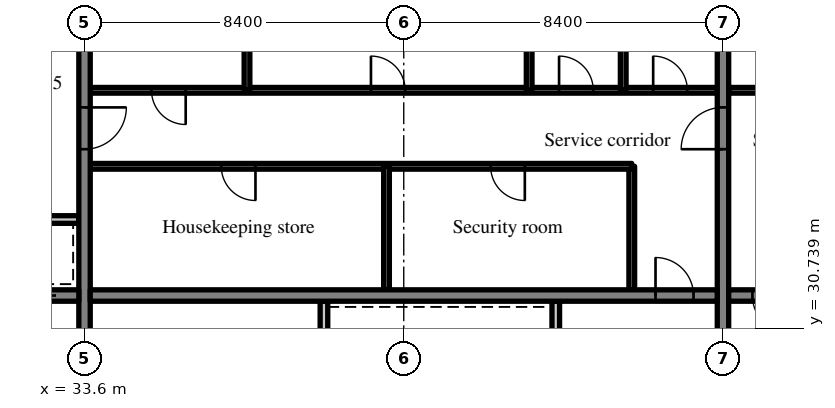
"""IFC4 building model, lengths in metres.
Left out: names, types, materials, properties, quantities, classifications, styles, units other than length and angle.
Written with IfcOpenShell. Run it as: python <this file> out.ifc"""

import sys

from ifc_helpers import new_model, si_unit, direction, frame, frame_2d, origin, place, context, subcontext, project, spatial, rectangle, extrude, source, transform, mapped, element, fill, save


model = new_model("IFC4")
c1 = context("Model", 3, precision=1e-05, world=origin(), true_north=direction((0.0, 1.0)))
c2 = subcontext(c1, "Body", "Model", "MODEL_VIEW")
j1 = project(units=[si_unit("LENGTHUNIT", "METRE"), si_unit("PLANEANGLEUNIT", "RADIAN")], contexts=[c1])
p1 = place(None, origin())
s1 = spatial("IfcSite", under=j1, at=p1, CompositionType="ELEMENT")
p2 = place(p1, origin())
s2 = spatial("IfcBuilding", under=s1, at=p2, CompositionType="ELEMENT")
p3 = place(p2, frame((0.0, 0.0, 301.7)))
s3 = spatial("IfcBuildingStorey", under=s2, at=p3, CompositionType="ELEMENT", Elevation=301.7)
m1 = source(origin(), c2, "Body", "SweptSolid", [
    extrude(rectangle(XDim=19.0, YDim=0.3, at=frame_2d((9.5, 0.0))), origin(), (0.0, 0.0, 1.0), 3.72),
])
p4 = place(p3, frame((33.6, 22.5, 0.0), z_axis=(0.0, 0.0, 1.0), x_axis=(0.0, 1.0, 0.0)))
e1 = element("IfcWall", 1, at=p4, inside=s3, PredefinedType="SHEAR", context=c2, shape_type="MappedRepresentation", body=[
    mapped(m1, transform((0.0, 0.0, 0.0), scale=1.0)),
])
m2 = source(origin(), c2, "Body", "SweptSolid", [
    extrude(rectangle(XDim=1.1, YDim=2.1, at=frame_2d((0.55, 1.05))), frame((0.0, 0.16, 0.0), z_axis=(0.0, -1.0, 0.0), x_axis=(1.0, 0.0, 0.0)), (0.0, 0.0, 1.0), 0.32),
])
p5 = place(p4, frame((12.95, 0.0, 0.0)))
e2 = element("IfcOpeningElement", 2, at=p5, cuts=e1, PredefinedType="OPENING", context=c2, shape_type="MappedRepresentation", body=[
    mapped(m2, transform((0.0, 0.0, 0.0), scale=1.0)),
])
p6 = place(p3, frame((50.4, 22.5, 0.0), z_axis=(0.0, 0.0, 1.0), x_axis=(0.0, 1.0, 0.0)))
e3 = element("IfcWall", 3, at=p6, inside=s3, PredefinedType="SHEAR", context=c2, shape_type="MappedRepresentation", body=[
    mapped(m1, transform((0.0, 0.0, 0.0), scale=1.0)),
])
p7 = place(p6, frame((12.95, 0.0, 0.0)))
e4 = element("IfcOpeningElement", 4, at=p7, cuts=e3, PredefinedType="OPENING", context=c2, shape_type="MappedRepresentation", body=[
    mapped(m2, transform((0.0, 0.0, 0.0), scale=1.0)),
])
m3 = source(origin(), c2, "Body", "SweptSolid", [
    extrude(rectangle(XDim=7.75, YDim=0.3, at=frame_2d((3.875, 0.0))), origin(), (0.0, 0.0, 1.0), 3.72),
])
p8 = place(p3, frame((25.7, 31.6, 0.0), z_axis=(0.0, 0.0, 1.0), x_axis=(1.0, 0.0, 0.0)))
e5 = element("IfcWall", 5, at=p8, inside=s3, PredefinedType="SHEAR", context=c2, shape_type="MappedRepresentation", body=[
    mapped(m3, transform((0.0, 0.0, 0.0), scale=1.0)),
])
p9 = place(p8, frame((6.05, 0.0, 0.0)))
e6 = element("IfcOpeningElement", 6, at=p9, cuts=e5, PredefinedType="OPENING", context=c2, shape_type="MappedRepresentation", body=[
    mapped(m2, transform((0.0, 0.0, 0.0), scale=1.0)),
])
m4 = source(origin(), c2, "Body", "SweptSolid", [
    extrude(rectangle(XDim=16.5, YDim=0.3, at=frame_2d((8.25, 0.0))), origin(), (0.0, 0.0, 1.0), 3.72),
])
p10 = place(p3, frame((33.75, 31.6, 0.0), z_axis=(0.0, 0.0, 1.0), x_axis=(1.0, 0.0, 0.0)))
e7 = element("IfcWall", 7, at=p10, inside=s3, PredefinedType="SHEAR", context=c2, shape_type="MappedRepresentation", body=[
    mapped(m4, transform((0.0, 0.0, 0.0), scale=1.0)),
])
m5 = source(origin(), c2, "Body", "SweptSolid", [
    extrude(rectangle(XDim=1.0, YDim=2.1, at=frame_2d((0.5, 1.05))), frame((0.0, 0.16, 0.0), z_axis=(0.0, -1.0, 0.0), x_axis=(1.0, 0.0, 0.0)), (0.0, 0.0, 1.0), 0.32),
])
p11 = place(p10, frame((14.875, 0.0, 0.0)))
e8 = element("IfcOpeningElement", 8, at=p11, cuts=e7, PredefinedType="OPENING", context=c2, shape_type="MappedRepresentation", body=[
    mapped(m5, transform((0.0, 0.0, 0.0), scale=1.0)),
])
p12 = place(p3, frame((50.55, 31.6, 0.0), z_axis=(0.0, 0.0, 1.0), x_axis=(1.0, 0.0, 0.0)))
e9 = element("IfcWall", 9, at=p12, inside=s3, PredefinedType="SHEAR", context=c2, shape_type="MappedRepresentation", body=[
    mapped(m4, transform((0.0, 0.0, 0.0), scale=1.0)),
])
p13 = place(p12, frame((0.625, 0.0, 0.0)))
e10 = element("IfcOpeningElement", 10, at=p13, cuts=e9, PredefinedType="OPENING", context=c2, shape_type="MappedRepresentation", body=[
    mapped(m5, transform((0.0, 0.0, 0.0), scale=1.0)),
])
m6 = source(origin(), c2, "Body", "SweptSolid", [
    extrude(rectangle(XDim=8.95, YDim=0.2, at=frame_2d((4.475, 0.0))), origin(), (0.0, 0.0, 1.0), 3.72),
])
p14 = place(p3, frame((39.9, 22.5, 0.0), z_axis=(0.0, 0.0, 1.0), x_axis=(0.0, 1.0, 0.0)))
e11 = element("IfcWall", 11, at=p14, inside=s3, PredefinedType="PARTITIONING", context=c2, shape_type="MappedRepresentation", body=[
    mapped(m6, transform((0.0, 0.0, 0.0), scale=1.0)),
])
m7 = source(origin(), c2, "Body", "SweptSolid", [
    extrude(rectangle(XDim=0.9, YDim=2.1, at=frame_2d((0.45, 1.05))), frame((0.0, 0.11, 0.0), z_axis=(0.0, -1.0, 0.0), x_axis=(1.0, 0.0, 0.0)), (0.0, 0.0, 1.0), 0.22),
])
p15 = place(p14, frame((5.05, 0.0, 0.0)))
e12 = element("IfcOpeningElement", 12, at=p15, cuts=e11, PredefinedType="OPENING", context=c2, shape_type="MappedRepresentation", body=[
    mapped(m7, transform((0.0, 0.0, 0.0), scale=1.0)),
])
m8 = source(origin(), c2, "Body", "SweptSolid", [
    extrude(rectangle(XDim=2.65, YDim=0.2, at=frame_2d((1.325, 0.0))), origin(), (0.0, 0.0, 1.0), 3.72),
])
p16 = place(p3, frame((46.0, 28.8, 0.0), z_axis=(0.0, 0.0, 1.0), x_axis=(0.0, 1.0, 0.0)))
e13 = element("IfcWall", 13, at=p16, inside=s3, PredefinedType="SOLIDWALL", context=c2, shape_type="MappedRepresentation", body=[
    mapped(m8, transform((0.0, 0.0, 0.0), scale=1.0)),
])
m9 = source(origin(), c2, "Body", "SweptSolid", [
    extrude(rectangle(XDim=3.25, YDim=0.15, at=frame_2d((1.625, 0.0))), origin(), (0.0, 0.0, 1.0), 3.72),
])
p17 = place(p3, frame((48.0, 31.75, 0.0), z_axis=(0.0, 0.0, 1.0), x_axis=(0.0, 1.0, 0.0)))
e14 = element("IfcWall", 14, at=p17, inside=s3, PredefinedType="PARTITIONING", context=c2, shape_type="MappedRepresentation", body=[
    mapped(m9, transform((0.0, 0.0, 0.0), scale=1.0)),
])
m10 = source(origin(), c2, "Body", "SweptSolid", [
    extrude(rectangle(XDim=14.25, YDim=0.15, at=frame_2d((7.125, 0.0))), origin(), (0.0, 0.0, 1.0), 3.72),
])
p18 = place(p3, frame((33.75, 35.0, 0.0), z_axis=(0.0, 0.0, 1.0), x_axis=(1.0, 0.0, 0.0)))
e15 = element("IfcWall", 15, at=p18, inside=s3, PredefinedType="PARTITIONING", context=c2, shape_type="MappedRepresentation", body=[
    mapped(m10, transform((0.0, 0.0, 0.0), scale=1.0)),
])
m11 = source(origin(), c2, "Body", "SweptSolid", [
    extrude(rectangle(XDim=0.9, YDim=2.1, at=frame_2d((0.45, 1.05))), frame((0.0, 0.085, 0.0), z_axis=(0.0, -1.0, 0.0), x_axis=(1.0, 0.0, 0.0)), (0.0, 0.0, 1.0), 0.17),
])
p19 = place(p18, frame((3.448, 0.0, 0.0)))
e16 = element("IfcOpeningElement", 16, at=p19, cuts=e15, PredefinedType="OPENING", context=c2, shape_type="MappedRepresentation", body=[
    mapped(m11, transform((0.0, 0.0, 0.0), scale=1.0)),
])
p20 = place(p18, frame((10.536, 0.0, 0.0)))
e17 = element("IfcOpeningElement", 17, at=p20, cuts=e15, PredefinedType="OPENING", context=c2, shape_type="MappedRepresentation", body=[
    mapped(m11, transform((0.0, 0.0, 0.0), scale=1.0)),
])
m12 = source(origin(), c2, "Body", "SweptSolid", [
    extrude(rectangle(XDim=16.5, YDim=0.15, at=frame_2d((8.25, 0.0))), origin(), (0.0, 0.0, 1.0), 3.72),
])
p21 = place(p3, frame((33.75, 37.0, 0.0), z_axis=(0.0, 0.0, 1.0), x_axis=(1.0, 0.0, 0.0)))
e18 = element("IfcWall", 18, at=p21, inside=s3, PredefinedType="PARTITIONING", context=c2, shape_type="MappedRepresentation", body=[
    mapped(m12, transform((0.0, 0.0, 0.0), scale=1.0)),
])
p22 = place(p21, frame((1.612, 0.0, 0.0)))
e19 = element("IfcOpeningElement", 19, at=p22, cuts=e18, PredefinedType="OPENING", context=c2, shape_type="MappedRepresentation", body=[
    mapped(m11, transform((0.0, 0.0, 0.0), scale=1.0)),
])
p23 = place(p21, frame((7.387, 0.0, 0.0)))
e20 = element("IfcOpeningElement", 20, at=p23, cuts=e18, PredefinedType="OPENING", context=c2, shape_type="MappedRepresentation", body=[
    mapped(m11, transform((0.0, 0.0, 0.0), scale=1.0)),
])
p24 = place(p21, frame((12.337, 0.0, 0.0)))
e21 = element("IfcOpeningElement", 21, at=p24, cuts=e18, PredefinedType="OPENING", context=c2, shape_type="MappedRepresentation", body=[
    mapped(m11, transform((0.0, 0.0, 0.0), scale=1.0)),
])
p25 = place(p21, frame((14.813, 0.0, 0.0)))
e22 = element("IfcOpeningElement", 22, at=p25, cuts=e18, PredefinedType="OPENING", context=c2, shape_type="MappedRepresentation", body=[
    mapped(m11, transform((0.0, 0.0, 0.0), scale=1.0)),
])
p26 = place(p3, frame((41.546, 31.75, 0.0), z_axis=(0.0, 0.0, 1.0), x_axis=(0.0, 1.0, 0.0)))
e23 = element("IfcWall", 23, at=p26, inside=s3, PredefinedType="PARTITIONING", context=c2, shape_type="MappedRepresentation", body=[
    mapped(m9, transform((0.0, 0.0, 0.0), scale=1.0)),
])
m13 = source(origin(), c2, "Body", "SweptSolid", [
    extrude(rectangle(XDim=4.5, YDim=0.15, at=frame_2d((2.25, 0.0))), origin(), (0.0, 0.0, 1.0), 3.72),
])
for number, where, z_axis, x_axis in (
    (24, (37.875, 37.0, 0.0), (0.0, 0.0, 1.0), (0.0, 1.0, 0.0)),
    (25, (45.3, 37.0, 0.0), (0.0, 0.0, 1.0), (0.0, 1.0, 0.0)),
    (26, (47.775, 37.0, 0.0), (0.0, 0.0, 1.0), (0.0, 1.0, 0.0)),
):
    element("IfcWall", number, at=place(p3, frame(where, z_axis=z_axis, x_axis=x_axis)), inside=s3, PredefinedType="PARTITIONING", context=c2, shape_type="MappedRepresentation", body=[
        mapped(m13, transform((0.0, 0.0, 0.0), scale=1.0)),
    ])
p27 = place(p3, frame((67.05, 37.0, 0.0), z_axis=(0.0, 0.0, 1.0), x_axis=(-1.0, 0.0, 0.0)))
e27 = element("IfcWall", 27, at=p27, inside=s3, PredefinedType="PARTITIONING", context=c2, shape_type="MappedRepresentation", body=[
    mapped(m12, transform((0.0, 0.0, 0.0), scale=1.0)),
])
p28 = place(p27, frame((3.263, 0.0, 0.0)))
e28 = element("IfcOpeningElement", 28, at=p28, cuts=e27, PredefinedType="OPENING", context=c2, shape_type="MappedRepresentation", body=[
    mapped(m11, transform((0.0, 0.0, 0.0), scale=1.0)),
])
p29 = place(p27, frame((8.212, 0.0, 0.0)))
e29 = element("IfcOpeningElement", 29, at=p29, cuts=e27, PredefinedType="OPENING", context=c2, shape_type="MappedRepresentation", body=[
    mapped(m11, transform((0.0, 0.0, 0.0), scale=1.0)),
])
p30 = place(p27, frame((11.513, 0.0, 0.0)))
e30 = element("IfcOpeningElement", 30, at=p30, cuts=e27, PredefinedType="OPENING", context=c2, shape_type="MappedRepresentation", body=[
    mapped(m11, transform((0.0, 0.0, 0.0), scale=1.0)),
])
p31 = place(p27, frame((14.813, 0.0, 0.0)))
e31 = element("IfcOpeningElement", 31, at=p31, cuts=e27, PredefinedType="OPENING", context=c2, shape_type="MappedRepresentation", body=[
    mapped(m11, transform((0.0, 0.0, 0.0), scale=1.0)),
])
m14 = source(origin(), c2, "Body", "SweptSolid", [
    extrude(rectangle(XDim=2.3, YDim=0.2, at=frame_2d((1.15, 0.0))), origin(), (0.0, 0.0, 1.0), 3.72),
])
p32 = place(p3, frame((31.15, 33.6, 0.0), z_axis=(0.0, 0.0, 1.0), x_axis=(1.0, 0.0, 0.0)))
e32 = element("IfcWall", 32, at=p32, inside=s3, PredefinedType="SOLIDWALL", context=c2, shape_type="MappedRepresentation", body=[
    mapped(m14, transform((0.0, 0.0, 0.0), scale=1.0)),
])
m15 = source(origin(), c2, "Body", "SweptSolid", [
    extrude(rectangle(XDim=1.0, YDim=2.1, at=frame_2d((0.5, 1.05))), frame((0.0, 0.025, 0.0), z_axis=(0.0, -1.0, 0.0), x_axis=(1.0, 0.0, 0.0)), (0.0, 0.0, 1.0), 0.05),
])
p33 = place(p11, origin())
e33 = element("IfcDoor", 33, at=p33, inside=s3, OperationType="SINGLE_SWING_LEFT", PredefinedType="DOOR", context=c2, shape_type="MappedRepresentation", body=[
    mapped(m15, transform((0.0, 0.0, 0.0), scale=1.0)),
])
fill(e8, e33)
m16 = source(origin(), c2, "Body", "SweptSolid", [
    extrude(rectangle(XDim=0.9, YDim=2.1, at=frame_2d((0.45, 1.05))), frame((0.0, 0.025, 0.0), z_axis=(0.0, -1.0, 0.0), x_axis=(1.0, 0.0, 0.0)), (0.0, 0.0, 1.0), 0.05),
])
p34 = place(p19, origin())
e34 = element("IfcDoor", 34, at=p34, inside=s3, OperationType="SINGLE_SWING_RIGHT", PredefinedType="DOOR", context=c2, shape_type="MappedRepresentation", body=[
    mapped(m16, transform((0.0, 0.0, 0.0), scale=1.0)),
])
fill(e16, e34)
p35 = place(p20, origin())
e35 = element("IfcDoor", 35, at=p35, inside=s3, OperationType="SINGLE_SWING_RIGHT", PredefinedType="DOOR", context=c2, shape_type="MappedRepresentation", body=[
    mapped(m16, transform((0.0, 0.0, 0.0), scale=1.0)),
])
fill(e17, e35)
p36 = place(p22, origin())
e36 = element("IfcDoor", 36, at=p36, inside=s3, OperationType="SINGLE_SWING_RIGHT", PredefinedType="DOOR", context=c2, shape_type="MappedRepresentation", body=[
    mapped(m16, transform((0.0, 0.0, 0.0), scale=1.0)),
])
fill(e19, e36)
p37 = place(p23, origin())
e37 = element("IfcDoor", 37, at=p37, inside=s3, OperationType="SINGLE_SWING_LEFT", PredefinedType="DOOR", context=c2, shape_type="MappedRepresentation", body=[
    mapped(m16, transform((0.0, 0.0, 0.0), scale=1.0)),
])
fill(e20, e37)
p38 = place(p24, origin())
e38 = element("IfcDoor", 38, at=p38, inside=s3, OperationType="SINGLE_SWING_LEFT", PredefinedType="DOOR", context=c2, shape_type="MappedRepresentation", body=[
    mapped(m16, transform((0.0, 0.0, 0.0), scale=1.0)),
])
fill(e21, e38)
p39 = place(p25, origin())
e39 = element("IfcDoor", 39, at=p39, inside=s3, OperationType="SINGLE_SWING_LEFT", PredefinedType="DOOR", context=c2, shape_type="MappedRepresentation", body=[
    mapped(m16, transform((0.0, 0.0, 0.0), scale=1.0)),
])
fill(e22, e39)
p40 = place(p13, origin())
e40 = element("IfcDoor", 40, at=p40, inside=s3, OperationType="SINGLE_SWING_RIGHT", PredefinedType="DOOR", context=c2, shape_type="MappedRepresentation", body=[
    mapped(m15, transform((0.0, 0.0, 0.0), scale=1.0)),
])
fill(e10, e40)
m17 = source(origin(), c2, "Body", "SweptSolid", [
    extrude(rectangle(XDim=1.1, YDim=2.1, at=frame_2d((0.55, 1.05))), frame((0.0, 0.025, 0.0), z_axis=(0.0, -1.0, 0.0), x_axis=(1.0, 0.0, 0.0)), (0.0, 0.0, 1.0), 0.05),
])
p41 = place(p9, origin())
e41 = element("IfcDoor", 41, at=p41, inside=s3, OperationType="SLIDING_TO_LEFT", PredefinedType="DOOR", context=c2, shape_type="MappedRepresentation", body=[
    mapped(m17, transform((0.0, 0.0, 0.0), scale=1.0)),
])
fill(e6, e41)
p42 = place(p5, origin())
e42 = element("IfcDoor", 42, at=p42, inside=s3, OperationType="SINGLE_SWING_RIGHT", PredefinedType="DOOR", context=c2, shape_type="MappedRepresentation", body=[
    mapped(m17, transform((0.0, 0.0, 0.0), scale=1.0)),
])
fill(e2, e42)
p43 = place(p7, origin())
e43 = element("IfcDoor", 43, at=p43, inside=s3, OperationType="SINGLE_SWING_LEFT", PredefinedType="DOOR", context=c2, shape_type="MappedRepresentation", body=[
    mapped(m17, transform((0.0, 0.0, 0.0), scale=1.0)),
])
fill(e4, e43)
save(model, sys.argv[1])
